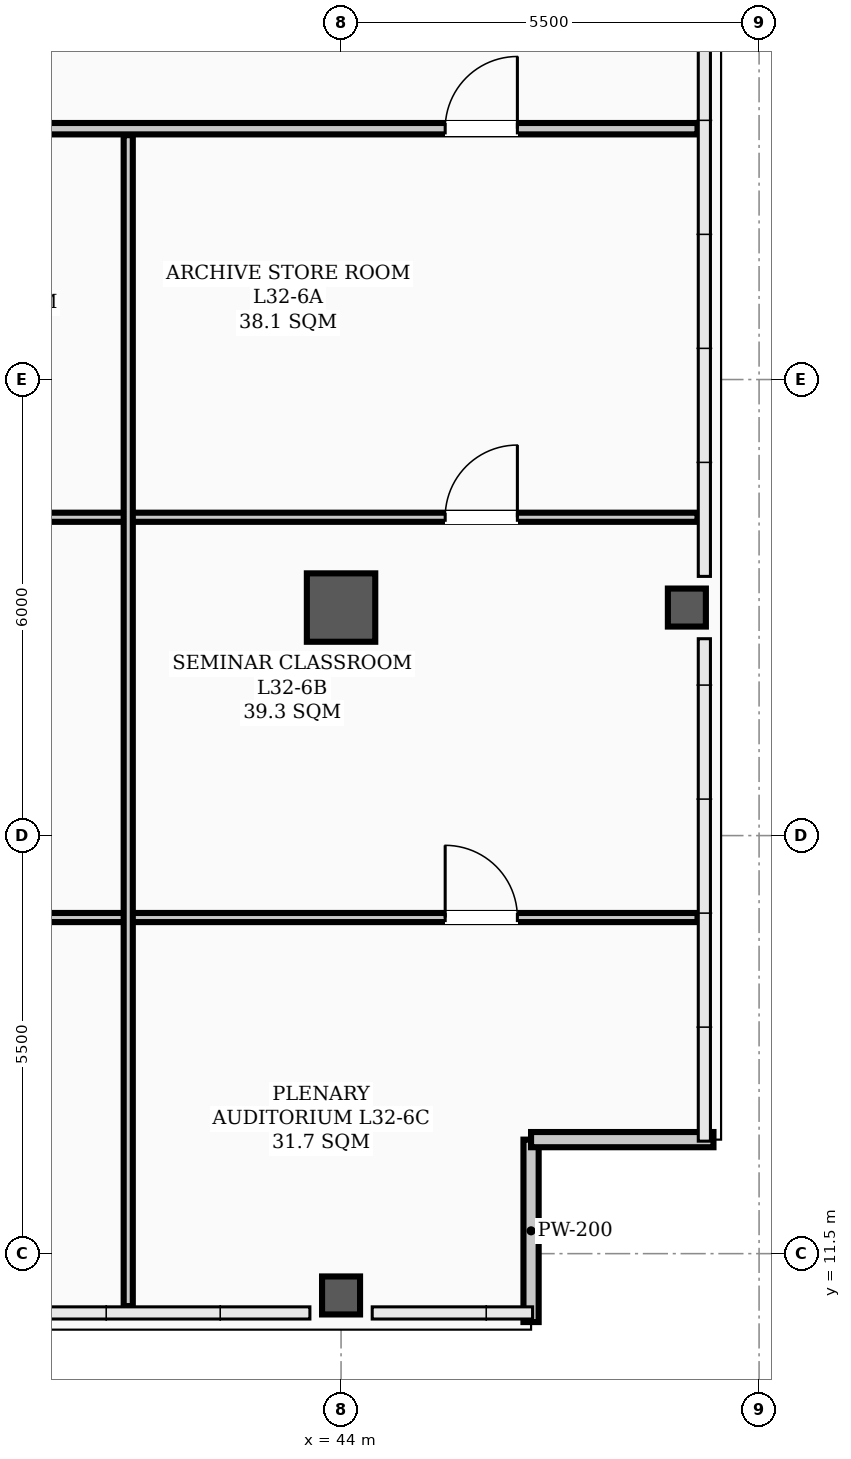
"""IFC4 building model, lengths in metres.
Left out: names, types, materials, properties, quantities, classifications, styles, units other than length and angle.
Written with IfcOpenShell. Run it as: python <this file> out.ifc"""

import sys

from ifc_helpers import new_model, si_unit, direction, frame, frame_2d, origin, origin_2d, place, context, subcontext, project, spatial, rectangle, hollow_rectangle, extrude, element, fill, save


model = new_model("IFC4")
c1 = context("Model", 3, precision=1e-05, world=origin(), true_north=direction((0.0, 1.0)))
c2 = subcontext(c1, "Body", "Model", "MODEL_VIEW")
j1 = project(units=[si_unit("LENGTHUNIT", "METRE"), si_unit("PLANEANGLEUNIT", "RADIAN")], contexts=[c1])
p1 = place(None, origin())
s1 = spatial("IfcSite", under=j1, at=p1, CompositionType="ELEMENT")
p2 = place(p1, origin())
s2 = spatial("IfcBuilding", under=s1, at=p2, CompositionType="ELEMENT")
p3 = place(p2, frame((0.0, 0.0, 130.5)))
s3 = spatial("IfcBuildingStorey", under=s2, at=p3, CompositionType="ELEMENT", Elevation=130.5)
p4 = place(p3, frame((44.0, 20.0, 0.0), z_axis=(0.0, 0.0, 1.0), x_axis=(1.0, 0.0, 0.0)))
e1 = element("IfcColumn", 1, at=p4, inside=s3, PredefinedType="COLUMN", context=c2, shape_type="SweptSolid", body=[
    extrude(hollow_rectangle(XDim=0.9, YDim=0.9, WallThickness=0.035, InnerFilletRadius=0.017, OuterFilletRadius=0.052, at=origin_2d()), origin(), (0.0, 0.0, 1.0), 3.9),
])
for number, where, z_axis, x_axis in (
    (2, (44.0, 10.95, 0.0), (0.0, 0.0, 1.0), (1.0, 0.0, 0.0)),
    (3, (48.55, 20.0, 0.0), (0.0, 0.0, 1.0), (1.0, 0.0, 0.0)),
):
    element("IfcColumn", number, at=place(p3, frame(where, z_axis=z_axis, x_axis=x_axis)), inside=s3, PredefinedType="COLUMN", context=c2, shape_type="SweptSolid", body=[
        extrude(hollow_rectangle(XDim=0.5, YDim=0.5, WallThickness=0.024, InnerFilletRadius=0.012, OuterFilletRadius=0.036, at=origin_2d()), origin(), (0.0, 0.0, 1.0), 3.9),
    ])
for number, where, z_axis, x_axis in (
    (4, (46.5, 10.6, 0.0), (0.0, 0.0, 1.0), (0.0, 1.0, 0.0)),
    (5, (46.5, 13.0, 0.0), (0.0, 0.0, 1.0), (1.0, 0.0, 0.0)),
):
    element("IfcWall", number, at=place(p3, frame(where, z_axis=z_axis, x_axis=x_axis)), inside=s3, PredefinedType="PARAPET", context=c2, shape_type="SweptSolid", body=[
        extrude(rectangle(XDim=2.4, YDim=0.2, at=frame_2d((1.2, 0.0))), origin(), (0.0, 0.0, 1.0), 1.2),
    ])
p5 = place(p3, frame((2.31, 26.3, 0.0), z_axis=(0.0, 0.0, 1.0), x_axis=(1.0, 0.0, 0.0)))
e6 = element("IfcWall", 6, at=p5, inside=s3, PredefinedType="PARTITIONING", context=c2, shape_type="SweptSolid", body=[
    extrude(rectangle(XDim=46.38, YDim=0.15, at=frame_2d((23.19, 0.0))), origin(), (0.0, 0.0, 1.0), 3.1),
])
p6 = place(p5, frame((12.515, 0.0, 0.0)))
e7 = element("IfcOpeningElement", 7, at=p6, cuts=e6, PredefinedType="OPENING", context=c2, shape_type="SweptSolid", body=[
    extrude(rectangle(XDim=0.95, YDim=2.08, at=frame_2d((0.475, 1.04))), frame((0.0, 0.085, 0.0), z_axis=(0.0, -1.0, 0.0), x_axis=(1.0, 0.0, 0.0)), (0.0, 0.0, 1.0), 0.17),
])
p7 = place(p5, frame((18.615, 0.0, 0.0)))
e8 = element("IfcOpeningElement", 8, at=p7, cuts=e6, PredefinedType="OPENING", context=c2, shape_type="SweptSolid", body=[
    extrude(rectangle(XDim=0.95, YDim=2.08, at=frame_2d((0.475, 1.04))), frame((0.0, 0.085, 0.0), z_axis=(0.0, -1.0, 0.0), x_axis=(1.0, 0.0, 0.0)), (0.0, 0.0, 1.0), 0.17),
])
p8 = place(p5, frame((26.115, 0.0, 0.0)))
e9 = element("IfcOpeningElement", 9, at=p8, cuts=e6, PredefinedType="OPENING", context=c2, shape_type="SweptSolid", body=[
    extrude(rectangle(XDim=0.95, YDim=2.08, at=frame_2d((0.475, 1.04))), frame((0.0, 0.085, 0.0), z_axis=(0.0, -1.0, 0.0), x_axis=(1.0, 0.0, 0.0)), (0.0, 0.0, 1.0), 0.17),
])
p9 = place(p5, frame((31.665, 0.0, 0.0)))
e10 = element("IfcOpeningElement", 10, at=p9, cuts=e6, PredefinedType="OPENING", context=c2, shape_type="SweptSolid", body=[
    extrude(rectangle(XDim=0.95, YDim=2.08, at=frame_2d((0.475, 1.04))), frame((0.0, 0.085, 0.0), z_axis=(0.0, -1.0, 0.0), x_axis=(1.0, 0.0, 0.0)), (0.0, 0.0, 1.0), 0.17),
])
p10 = place(p5, frame((43.06, 0.0, 0.0)))
e11 = element("IfcOpeningElement", 11, at=p10, cuts=e6, PredefinedType="OPENING", context=c2, shape_type="SweptSolid", body=[
    extrude(rectangle(XDim=0.95, YDim=2.08, at=frame_2d((0.475, 1.04))), frame((0.0, 0.085, 0.0), z_axis=(0.0, -1.0, 0.0), x_axis=(1.0, 0.0, 0.0)), (0.0, 0.0, 1.0), 0.17),
])
p11 = place(p3, frame((33.4, 21.188, 0.0), z_axis=(0.0, 0.0, 1.0), x_axis=(1.0, 0.0, 0.0)))
e12 = element("IfcWall", 12, at=p11, inside=s3, PredefinedType="PARTITIONING", context=c2, shape_type="SweptSolid", body=[
    extrude(rectangle(XDim=7.8, YDim=0.12, at=frame_2d((3.9, 0.0))), origin(), (0.0, 0.0, 1.0), 3.1),
])
p12 = place(p11, frame((0.575, 0.0, 0.0)))
e13 = element("IfcOpeningElement", 13, at=p12, cuts=e12, PredefinedType="OPENING", context=c2, shape_type="SweptSolid", body=[
    extrude(rectangle(XDim=0.95, YDim=2.08, at=frame_2d((0.475, 1.04))), frame((0.0, 0.07, 0.0), z_axis=(0.0, -1.0, 0.0), x_axis=(1.0, 0.0, 0.0)), (0.0, 0.0, 1.0), 0.14),
])
p13 = place(p3, frame((33.4, 15.922, 0.0), z_axis=(0.0, 0.0, 1.0), x_axis=(1.0, 0.0, 0.0)))
e14 = element("IfcWall", 14, at=p13, inside=s3, PredefinedType="PARTITIONING", context=c2, shape_type="SweptSolid", body=[
    extrude(rectangle(XDim=7.8, YDim=0.12, at=frame_2d((3.9, 0.0))), origin(), (0.0, 0.0, 1.0), 3.1),
])
p14 = place(p13, frame((0.575, 0.0, 0.0)))
e15 = element("IfcOpeningElement", 15, at=p14, cuts=e14, PredefinedType="OPENING", context=c2, shape_type="SweptSolid", body=[
    extrude(rectangle(XDim=0.95, YDim=2.08, at=frame_2d((0.475, 1.04))), frame((0.0, 0.07, 0.0), z_axis=(0.0, -1.0, 0.0), x_axis=(1.0, 0.0, 0.0)), (0.0, 0.0, 1.0), 0.14),
])
p15 = place(p3, frame((41.2, 21.188, 0.0), z_axis=(0.0, 0.0, 1.0), x_axis=(1.0, 0.0, 0.0)))
e16 = element("IfcWall", 16, at=p15, inside=s3, PredefinedType="PARTITIONING", context=c2, shape_type="SweptSolid", body=[
    extrude(rectangle(XDim=7.49, YDim=0.12, at=frame_2d((3.745, 0.0))), origin(), (0.0, 0.0, 1.0), 3.1),
])
p16 = place(p15, frame((4.17, 0.0, 0.0)))
e17 = element("IfcOpeningElement", 17, at=p16, cuts=e16, PredefinedType="OPENING", context=c2, shape_type="SweptSolid", body=[
    extrude(rectangle(XDim=0.95, YDim=2.08, at=frame_2d((0.475, 1.04))), frame((0.0, 0.07, 0.0), z_axis=(0.0, -1.0, 0.0), x_axis=(1.0, 0.0, 0.0)), (0.0, 0.0, 1.0), 0.14),
])
p17 = place(p3, frame((41.2, 15.922, 0.0), z_axis=(0.0, 0.0, 1.0), x_axis=(1.0, 0.0, 0.0)))
e18 = element("IfcWall", 18, at=p17, inside=s3, PredefinedType="PARTITIONING", context=c2, shape_type="SweptSolid", body=[
    extrude(rectangle(XDim=7.49, YDim=0.12, at=frame_2d((3.745, 0.0))), origin(), (0.0, 0.0, 1.0), 3.1),
])
p18 = place(p17, frame((4.17, 0.0, 0.0)))
e19 = element("IfcOpeningElement", 19, at=p18, cuts=e18, PredefinedType="OPENING", context=c2, shape_type="SweptSolid", body=[
    extrude(rectangle(XDim=0.95, YDim=2.08, at=frame_2d((0.475, 1.04))), frame((0.0, 0.07, 0.0), z_axis=(0.0, -1.0, 0.0), x_axis=(1.0, 0.0, 0.0)), (0.0, 0.0, 1.0), 0.14),
])
p19 = place(p3, frame((41.2, 10.81, 0.0), z_axis=(0.0, 0.0, 1.0), x_axis=(0.0, 1.0, 0.0)))
e20 = element("IfcWall", 20, at=p19, inside=s3, PredefinedType="PARTITIONING", context=c2, shape_type="SweptSolid", body=[
    extrude(rectangle(XDim=15.405, YDim=0.12, at=frame_2d((7.703, 0.0))), origin(), (0.0, 0.0, 1.0), 3.0),
])
p20 = place(p16, origin())
e21 = element("IfcDoor", 21, at=p20, inside=s3, OperationType="SINGLE_SWING_RIGHT", PredefinedType="DOOR", context=c2, shape_type="SweptSolid", body=[
    extrude(rectangle(XDim=0.95, YDim=2.08, at=frame_2d((0.475, 1.04))), frame((0.0, 0.025, 0.0), z_axis=(0.0, -1.0, 0.0), x_axis=(1.0, 0.0, 0.0)), (0.0, 0.0, 1.0), 0.05),
])
fill(e17, e21)
p21 = place(p18, origin())
e22 = element("IfcDoor", 22, at=p21, inside=s3, OperationType="SINGLE_SWING_LEFT", PredefinedType="DOOR", context=c2, shape_type="SweptSolid", body=[
    extrude(rectangle(XDim=0.95, YDim=2.08, at=frame_2d((0.475, 1.04))), frame((0.0, 0.025, 0.0), z_axis=(0.0, -1.0, 0.0), x_axis=(1.0, 0.0, 0.0)), (0.0, 0.0, 1.0), 0.05),
])
fill(e19, e22)
p22 = place(p10, origin())
e23 = element("IfcDoor", 23, at=p22, inside=s3, OperationType="SINGLE_SWING_RIGHT", PredefinedType="DOOR", context=c2, shape_type="SweptSolid", body=[
    extrude(rectangle(XDim=0.95, YDim=2.08, at=frame_2d((0.475, 1.04))), frame((0.0, 0.025, 0.0), z_axis=(0.0, -1.0, 0.0), x_axis=(1.0, 0.0, 0.0)), (0.0, 0.0, 1.0), 0.05),
])
fill(e11, e23)
save(model, sys.argv[1])
